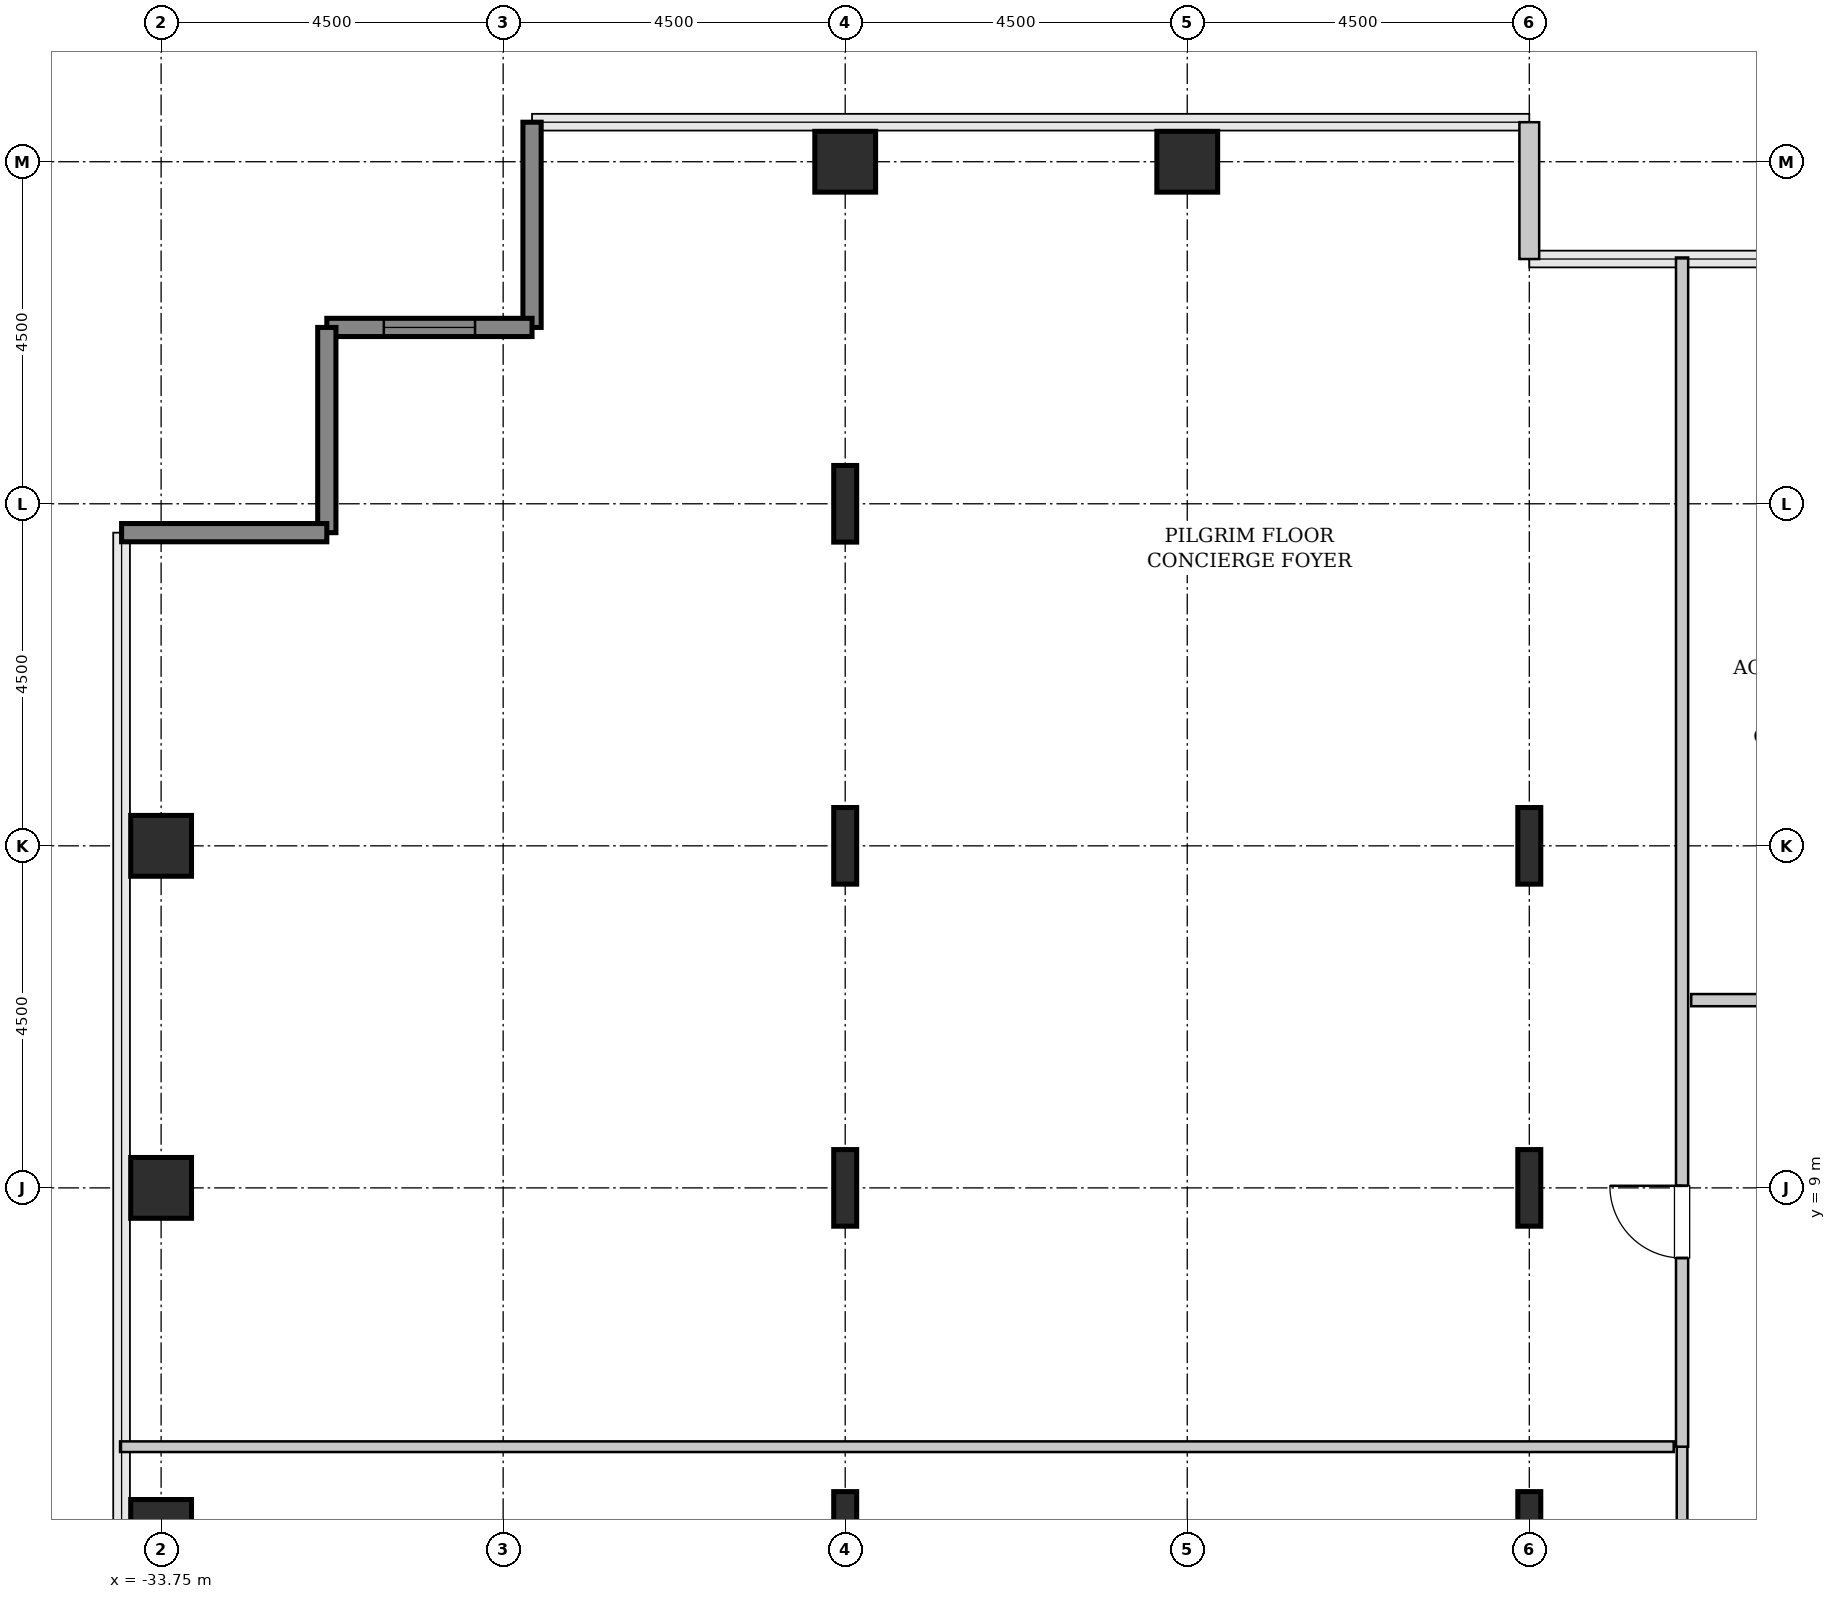
"""IFC4 building model, lengths in metres.
Left out: names, types, materials, properties, quantities, classifications, styles, units other than length and angle.
Written with IfcOpenShell. Run it as: python <this file> out.ifc"""

import sys

from ifc_helpers import new_model, si_unit, direction, frame, frame_2d, origin, origin_2d, place, context, subcontext, project, spatial, rectangle, hollow_rectangle, i_section, extrude, source, transform, mapped, element, fill, save


model = new_model("IFC4")
c1 = context("Model", 3, precision=1e-05, world=origin(), true_north=direction((0.0, 1.0)))
c2 = subcontext(c1, "Body", "Model", "MODEL_VIEW")
j1 = project(units=[si_unit("LENGTHUNIT", "METRE"), si_unit("PLANEANGLEUNIT", "RADIAN")], contexts=[c1])
p1 = place(None, origin())
s1 = spatial("IfcSite", under=j1, at=p1, CompositionType="ELEMENT")
p2 = place(p1, origin())
s2 = spatial("IfcBuilding", under=s1, at=p2, CompositionType="ELEMENT")
p3 = place(p2, frame((0.0, 0.0, 132.6)))
s3 = spatial("IfcBuildingStorey", under=s2, at=p3, CompositionType="ELEMENT", Elevation=132.6)
m1 = source(origin(), c2, "Body", "SweptSolid", [
    extrude(hollow_rectangle(XDim=0.8, YDim=0.8, WallThickness=0.04, InnerFilletRadius=0.04, OuterFilletRadius=0.08, at=origin_2d()), origin(), (0.0, 0.0, 1.0), 3.8),
])
for number, where, z_axis, x_axis in (
    (1, (-33.75, 4.5, 0.0), (0.0, 0.0, 1.0), (1.0, 0.0, 0.0)),
    (2, (-33.75, 9.0, 0.0), (0.0, 0.0, 1.0), (1.0, 0.0, 0.0)),
    (3, (-33.75, 13.5, 0.0), (0.0, 0.0, 1.0), (1.0, 0.0, 0.0)),
):
    element("IfcColumn", number, at=place(p3, frame(where, z_axis=z_axis, x_axis=x_axis)), inside=s3, PredefinedType="COLUMN", context=c2, shape_type="MappedRepresentation", body=[
        mapped(m1, transform((0.0, 0.0, 0.0), x_axis=(1.0, 0.0, 0.0), y_axis=(0.0, 1.0, 0.0), z_axis=(0.0, 0.0, 1.0), scale=1.0)),
    ])
m2 = source(origin(), c2, "Body", "SweptSolid", [
    extrude(i_section(OverallWidth=0.302, OverallDepth=1.008, WebThickness=0.021, FlangeThickness=0.04, FilletRadius=0.03, at=origin_2d()), origin(), (0.0, 0.0, 1.0), 3.8),
])
for number, where, z_axis, x_axis in (
    (4, (-24.75, 4.5, 0.0), (0.0, 0.0, 1.0), (1.0, 0.0, 0.0)),
    (5, (-24.75, 9.0, 0.0), (0.0, 0.0, 1.0), (1.0, 0.0, 0.0)),
    (6, (-24.75, 13.5, 0.0), (0.0, 0.0, 1.0), (1.0, 0.0, 0.0)),
    (7, (-24.75, 18.0, 0.0), (0.0, 0.0, 1.0), (1.0, 0.0, 0.0)),
):
    element("IfcColumn", number, at=place(p3, frame(where, z_axis=z_axis, x_axis=x_axis)), inside=s3, PredefinedType="COLUMN", context=c2, shape_type="MappedRepresentation", body=[
        mapped(m2, transform((0.0, 0.0, 0.0), x_axis=(1.0, 0.0, 0.0), y_axis=(0.0, 1.0, 0.0), z_axis=(0.0, 0.0, 1.0), scale=1.0)),
    ])
for number, where, z_axis, x_axis in (
    (8, (-24.75, 22.5, 0.0), (0.0, 0.0, 1.0), (1.0, 0.0, 0.0)),
    (9, (-20.25, 22.5, 0.0), (0.0, 0.0, 1.0), (1.0, 0.0, 0.0)),
):
    element("IfcColumn", number, at=place(p3, frame(where, z_axis=z_axis, x_axis=x_axis)), inside=s3, PredefinedType="COLUMN", context=c2, shape_type="MappedRepresentation", body=[
        mapped(m1, transform((0.0, 0.0, 0.0), x_axis=(1.0, 0.0, 0.0), y_axis=(0.0, 1.0, 0.0), z_axis=(0.0, 0.0, 1.0), scale=1.0)),
    ])
for number, where, z_axis, x_axis in (
    (10, (-15.75, 4.5, 0.0), (0.0, 0.0, 1.0), (1.0, 0.0, 0.0)),
    (11, (-15.75, 9.0, 0.0), (0.0, 0.0, 1.0), (1.0, 0.0, 0.0)),
    (12, (-15.75, 13.5, 0.0), (0.0, 0.0, 1.0), (1.0, 0.0, 0.0)),
):
    element("IfcColumn", number, at=place(p3, frame(where, z_axis=z_axis, x_axis=x_axis)), inside=s3, PredefinedType="COLUMN", context=c2, shape_type="MappedRepresentation", body=[
        mapped(m2, transform((0.0, 0.0, 0.0), x_axis=(1.0, 0.0, 0.0), y_axis=(0.0, 1.0, 0.0), z_axis=(0.0, 0.0, 1.0), scale=1.0)),
    ])
m3 = source(origin(), c2, "Body", "SweptSolid", [
    extrude(rectangle(XDim=1.8, YDim=0.26, at=frame_2d((0.9, 0.0))), origin(), (0.0, 0.0, 1.0), 3.55),
])
p4 = place(p3, frame((-15.75, 21.22, 0.0), z_axis=(0.0, 0.0, 1.0), x_axis=(0.0, 1.0, 0.0)))
e13 = element("IfcWall", 13, at=p4, inside=s3, PredefinedType="SOLIDWALL", context=c2, shape_type="MappedRepresentation", body=[
    mapped(m3, transform((0.0, 0.0, 0.0), x_axis=(1.0, 0.0, 0.0), y_axis=(0.0, 1.0, 0.0), z_axis=(0.0, 0.0, 1.0), scale=1.0)),
])
m4 = source(origin(), c2, "Body", "SweptSolid", [
    extrude(rectangle(XDim=2.7, YDim=0.24, at=frame_2d((1.35, 0.0))), origin(), (0.0, 0.0, 1.0), 3.55),
])
p5 = place(p3, frame((-28.87, 23.02, 0.0), z_axis=(0.0, 0.0, 1.0), x_axis=(0.0, -1.0, 0.0)))
e14 = element("IfcWall", 14, at=p5, inside=s3, PredefinedType="SHEAR", context=c2, shape_type="MappedRepresentation", body=[
    mapped(m4, transform((0.0, 0.0, 0.0), x_axis=(1.0, 0.0, 0.0), y_axis=(0.0, 1.0, 0.0), z_axis=(0.0, 0.0, 1.0), scale=1.0)),
])
p6 = place(p3, frame((-28.87, 20.32, 0.0), z_axis=(0.0, 0.0, 1.0), x_axis=(-1.0, 0.0, 0.0)))
e15 = element("IfcWall", 15, at=p6, inside=s3, PredefinedType="SHEAR", context=c2, shape_type="MappedRepresentation", body=[
    mapped(m4, transform((0.0, 0.0, 0.0), x_axis=(1.0, 0.0, 0.0), y_axis=(0.0, 1.0, 0.0), z_axis=(0.0, 0.0, 1.0), scale=1.0)),
])
p7 = place(p6, frame((0.75, 0.0, 0.85)))
e16 = element("IfcOpeningElement", 16, at=p7, cuts=e15, PredefinedType="OPENING", context=c2, shape_type="SweptSolid", body=[
    extrude(rectangle(XDim=1.2, YDim=1.8, at=frame_2d((0.6, 0.9))), frame((0.0, 0.13, 0.0), z_axis=(0.0, -1.0, 0.0), x_axis=(1.0, 0.0, 0.0)), (0.0, 0.0, 1.0), 0.26),
])
for number, where, z_axis, x_axis in (
    (17, (-31.57, 20.32, 0.0), (0.0, 0.0, 1.0), (0.0, -1.0, 0.0)),
    (18, (-31.57, 17.62, 0.0), (0.0, 0.0, 1.0), (-1.0, 0.0, 0.0)),
):
    element("IfcWall", number, at=place(p3, frame(where, z_axis=z_axis, x_axis=x_axis)), inside=s3, PredefinedType="SHEAR", context=c2, shape_type="MappedRepresentation", body=[
        mapped(m4, transform((0.0, 0.0, 0.0), x_axis=(1.0, 0.0, 0.0), y_axis=(0.0, 1.0, 0.0), z_axis=(0.0, 0.0, 1.0), scale=1.0)),
    ])
m5 = source(origin(), c2, "Body", "SweptSolid", [
    extrude(rectangle(XDim=2.375, YDim=0.14, at=frame_2d((1.188, 0.0))), origin(), (0.0, 0.0, 1.0), 3.535),
])
p8 = place(p3, frame((-13.74, 3.23, 0.0), z_axis=(0.0, 0.0, 1.0), x_axis=(0.0, 1.0, 0.0)))
e19 = element("IfcWall", 19, at=p8, inside=s3, PredefinedType="PARTITIONING", context=c2, shape_type="MappedRepresentation", body=[
    mapped(m5, transform((0.0, 0.0, 0.0), x_axis=(1.0, 0.0, 0.0), y_axis=(0.0, 1.0, 0.0), z_axis=(0.0, 0.0, 1.0), scale=1.0)),
])
m6 = source(origin(), c2, "Body", "SweptSolid", [
    extrude(rectangle(XDim=20.44, YDim=0.14, at=frame_2d((10.22, 0.0))), origin(), (0.0, 0.0, 1.0), 3.535),
])
p9 = place(p3, frame((-34.29, 5.595, 0.0), z_axis=(0.0, 0.0, 1.0), x_axis=(1.0, 0.0, 0.0)))
e20 = element("IfcWall", 20, at=p9, inside=s3, PredefinedType="PARTITIONING", context=c2, shape_type="MappedRepresentation", body=[
    mapped(m6, transform((0.0, 0.0, 0.0), x_axis=(1.0, 0.0, 0.0), y_axis=(0.0, 1.0, 0.0), z_axis=(0.0, 0.0, 1.0), scale=1.0)),
])
m7 = source(origin(), c2, "Body", "SweptSolid", [
    extrude(rectangle(XDim=15.645, YDim=0.16, at=frame_2d((7.823, 0.0))), origin(), (0.0, 0.0, 1.0), 3.535),
])
p10 = place(p3, frame((-13.74, 5.595, 0.0), z_axis=(0.0, 0.0, 1.0), x_axis=(0.0, 1.0, 0.0)))
e21 = element("IfcWall", 21, at=p10, inside=s3, PredefinedType="PARTITIONING", context=c2, shape_type="MappedRepresentation", body=[
    mapped(m7, transform((0.0, 0.0, 0.0), x_axis=(1.0, 0.0, 0.0), y_axis=(0.0, 1.0, 0.0), z_axis=(0.0, 0.0, 1.0), scale=1.0)),
])
p11 = place(p10, frame((2.482, 0.0, 0.0)))
e22 = element("IfcOpeningElement", 22, at=p11, cuts=e21, PredefinedType="OPENING", context=c2, shape_type="SweptSolid", body=[
    extrude(rectangle(XDim=0.95, YDim=2.1, at=frame_2d((0.475, 1.05))), frame((0.0, 0.09, 0.0), z_axis=(0.0, -1.0, 0.0), x_axis=(1.0, 0.0, 0.0)), (0.0, 0.0, 1.0), 0.18),
])
m8 = source(origin(), c2, "Body", "SweptSolid", [
    extrude(rectangle(XDim=4.125, YDim=0.16, at=frame_2d((2.062, 0.0))), origin(), (0.0, 0.0, 1.0), 3.535),
])
p12 = place(p3, frame((-13.62, 11.47, 0.0), z_axis=(0.0, 0.0, 1.0), x_axis=(1.0, 0.0, 0.0)))
e23 = element("IfcWall", 23, at=p12, inside=s3, PredefinedType="PARTITIONING", context=c2, shape_type="MappedRepresentation", body=[
    mapped(m8, transform((0.0, 0.0, 0.0), x_axis=(1.0, 0.0, 0.0), y_axis=(0.0, 1.0, 0.0), z_axis=(0.0, 0.0, 1.0), scale=1.0)),
])
p13 = place(p12, frame((1.587, 0.0, 0.0)))
e24 = element("IfcOpeningElement", 24, at=p13, cuts=e23, PredefinedType="OPENING", context=c2, shape_type="SweptSolid", body=[
    extrude(rectangle(XDim=0.95, YDim=2.1, at=frame_2d((0.475, 1.05))), frame((0.0, 0.09, 0.0), z_axis=(0.0, -1.0, 0.0), x_axis=(1.0, 0.0, 0.0)), (0.0, 0.0, 1.0), 0.18),
])
m9 = source(origin(), c2, "Body", "SweptSolid", [
    extrude(rectangle(XDim=1.2, YDim=1.8, at=frame_2d((0.6, 0.9))), frame((0.0, 0.03, 0.0), z_axis=(0.0, -1.0, 0.0), x_axis=(1.0, 0.0, 0.0)), (0.0, 0.0, 1.0), 0.06),
])
p14 = place(p7, origin())
e25 = element("IfcWindow", 25, at=p14, inside=s3, PartitioningType="SINGLE_PANEL", PredefinedType="WINDOW", context=c2, shape_type="MappedRepresentation", body=[
    mapped(m9, transform((0.0, 0.0, 0.0), x_axis=(1.0, 0.0, 0.0), y_axis=(0.0, 1.0, 0.0), z_axis=(0.0, 0.0, 1.0), scale=1.0)),
])
fill(e16, e25)
m10 = source(origin(), c2, "Body", "SweptSolid", [
    extrude(rectangle(XDim=0.95, YDim=2.1, at=frame_2d((0.475, 1.05))), frame((0.0, 0.025, 0.0), z_axis=(0.0, -1.0, 0.0), x_axis=(1.0, 0.0, 0.0)), (0.0, 0.0, 1.0), 0.05),
])
p15 = place(p11, origin())
e26 = element("IfcDoor", 26, at=p15, inside=s3, OperationType="SINGLE_SWING_RIGHT", PredefinedType="DOOR", context=c2, shape_type="MappedRepresentation", body=[
    mapped(m10, transform((0.0, 0.0, 0.0), x_axis=(1.0, 0.0, 0.0), y_axis=(0.0, 1.0, 0.0), z_axis=(0.0, 0.0, 1.0), scale=1.0)),
])
fill(e22, e26)
save(model, sys.argv[1])
